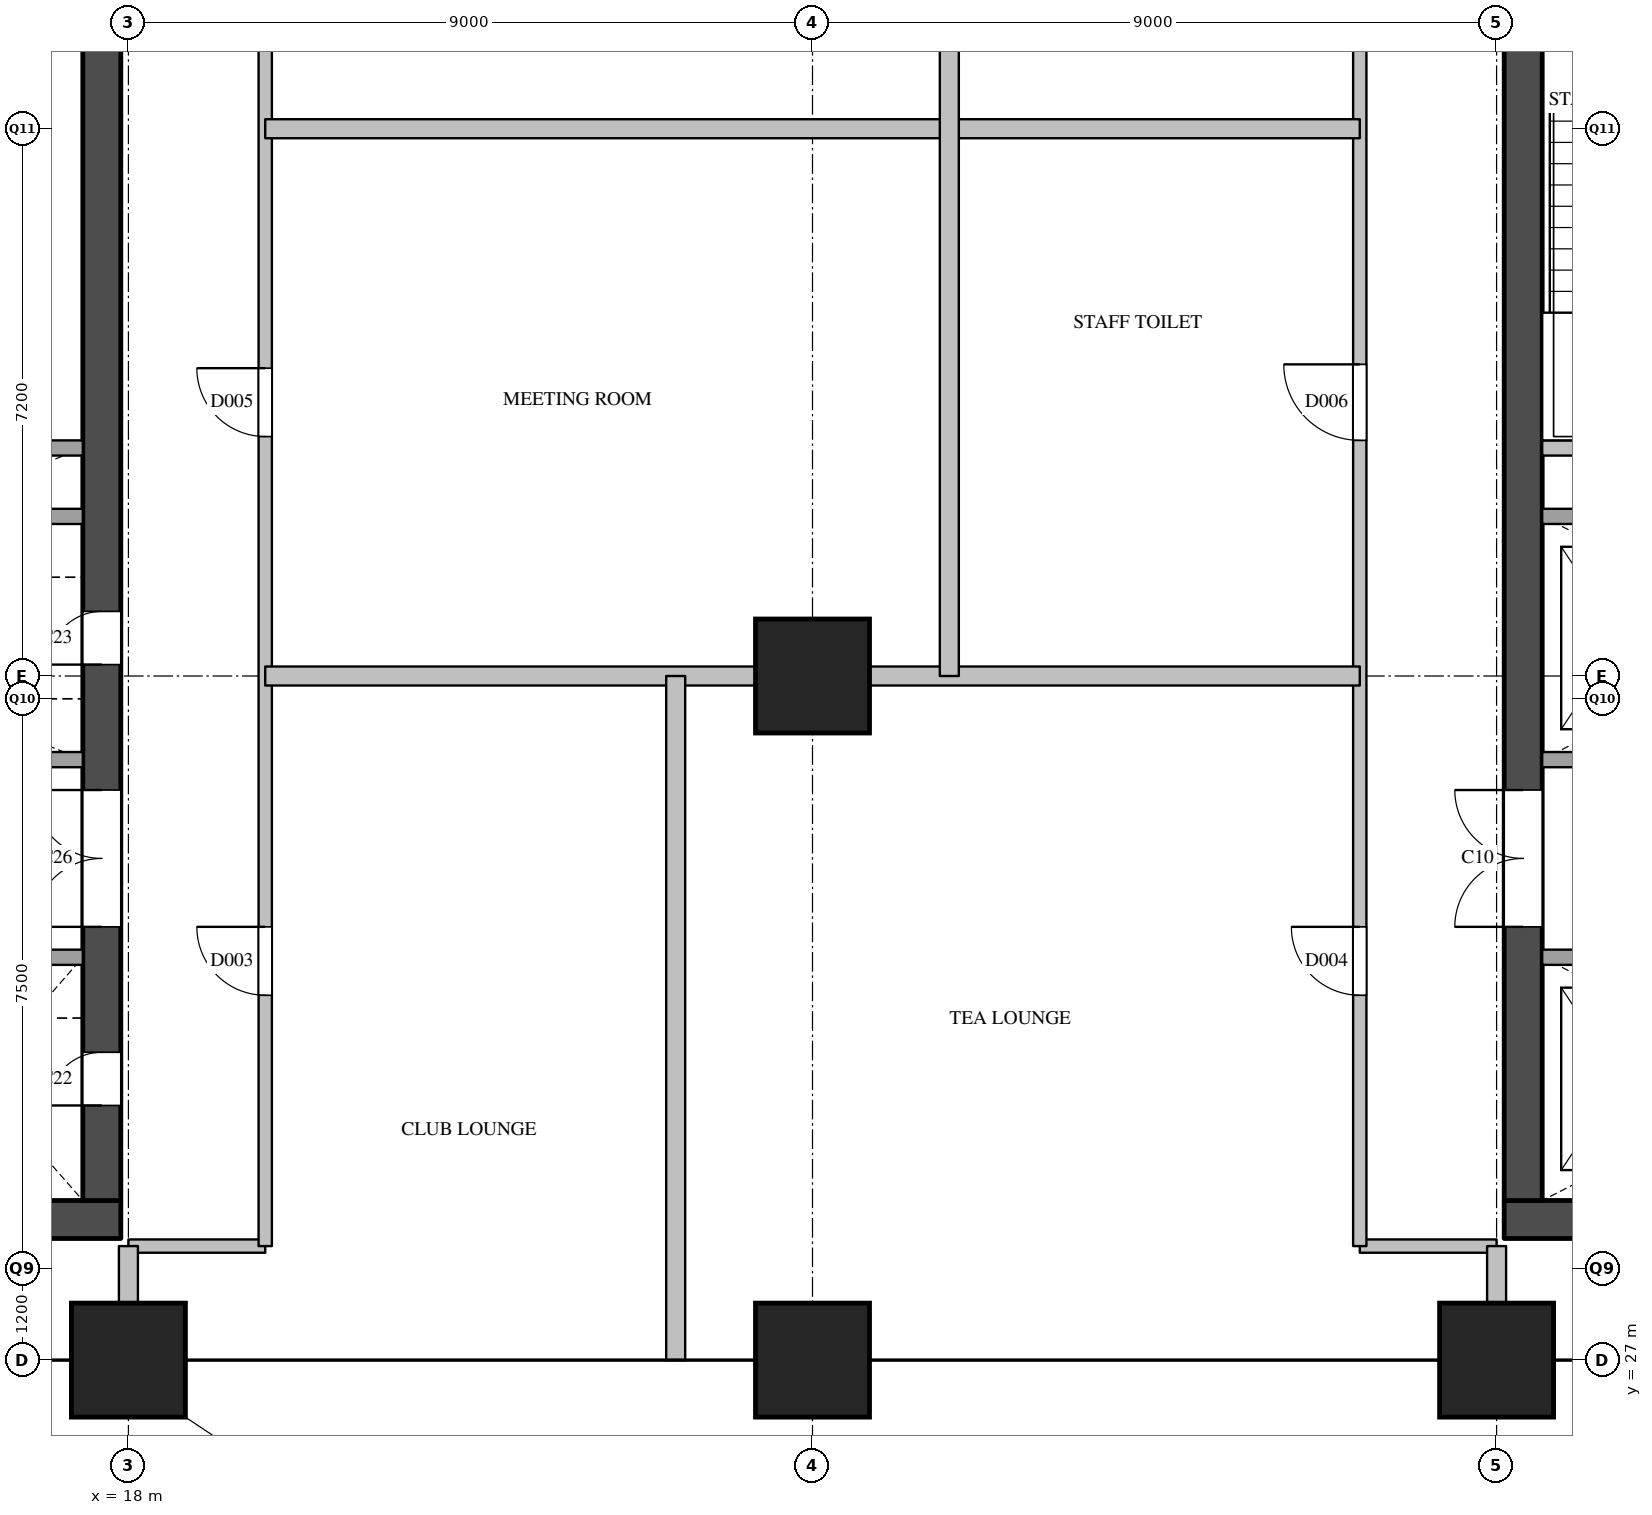
"""IFC4 building model, lengths in metres.
Left out: names, types, materials, properties, quantities, classifications, styles, units other than length and angle.
Written with IfcOpenShell. Run it as: python <this file> out.ifc"""

import sys

from ifc_helpers import new_model, si_unit, direction, frame, frame_2d, origin, origin_2d, place, context, subcontext, project, spatial, rectangle, extrude, element, fill, save


model = new_model("IFC4")
c1 = context("Model", 3, precision=1e-05, world=origin(), true_north=direction((0.0, 1.0)))
c2 = subcontext(c1, "Body", "Model", "MODEL_VIEW")
j1 = project(units=[si_unit("LENGTHUNIT", "METRE"), si_unit("PLANEANGLEUNIT", "RADIAN")], contexts=[c1])
p1 = place(None, origin())
s1 = spatial("IfcSite", under=j1, at=p1, CompositionType="ELEMENT")
p2 = place(p1, origin())
s2 = spatial("IfcBuilding", under=s1, at=p2, CompositionType="ELEMENT")
p3 = place(p2, frame((0.0, 0.0, 185.6)))
s3 = spatial("IfcBuildingStorey", under=s2, at=p3, CompositionType="ELEMENT", Elevation=185.6)
for number, where, z_axis, x_axis in (
    (1, (18.0, 27.0, 0.0), (0.0, 0.0, 1.0), (1.0, 0.0, 0.0)),
    (2, (27.0, 27.0, 0.0), (0.0, 0.0, 1.0), (1.0, 0.0, 0.0)),
    (3, (27.0, 36.0, 0.0), (0.0, 0.0, 1.0), (1.0, 0.0, 0.0)),
    (4, (36.0, 27.0, 0.0), (0.0, 0.0, 1.0), (1.0, 0.0, 0.0)),
):
    element("IfcColumn", number, at=place(p3, frame(where, z_axis=z_axis, x_axis=x_axis)), inside=s3, PredefinedType="COLUMN", context=c2, shape_type="SweptSolid", body=[
        extrude(rectangle(XDim=1.5, YDim=1.5, at=origin_2d()), origin(), (0.0, 0.0, 1.0), 3.9),
    ])
p4 = place(p3, frame((36.1, 28.85, 0.0), z_axis=(0.0, 0.0, 1.0), x_axis=(1.0, 0.0, 0.0)))
e5 = element("IfcWall", 5, at=p4, inside=s3, PredefinedType="SHEAR", context=c2, shape_type="SweptSolid", body=[
    extrude(rectangle(XDim=12.2, YDim=0.5, at=frame_2d((6.1, 0.0))), origin(), (0.0, 0.0, 1.0), 3.6),
])
p5 = place(p4, frame((0.95, 0.0, 0.0)))
e6 = element("IfcOpeningElement", 6, at=p5, cuts=e5, PredefinedType="OPENING", context=c2, shape_type="SweptSolid", body=[
    extrude(rectangle(XDim=1.2, YDim=2.1, at=frame_2d((0.6, 1.05))), frame((0.0, 0.26, 0.0), z_axis=(0.0, -1.0, 0.0), x_axis=(1.0, 0.0, 0.0)), (0.0, 0.0, 1.0), 0.52),
])
p6 = place(p4, frame((3.05, 0.0, 0.0)))
e7 = element("IfcOpeningElement", 7, at=p6, cuts=e5, PredefinedType="OPENING", context=c2, shape_type="SweptSolid", body=[
    extrude(rectangle(XDim=1.2, YDim=2.1, at=frame_2d((0.6, 1.05))), frame((0.0, 0.26, 0.0), z_axis=(0.0, -1.0, 0.0), x_axis=(1.0, 0.0, 0.0)), (0.0, 0.0, 1.0), 0.52),
])
p7 = place(p4, frame((5.15, 0.0, 0.0)))
e8 = element("IfcOpeningElement", 8, at=p7, cuts=e5, PredefinedType="OPENING", context=c2, shape_type="SweptSolid", body=[
    extrude(rectangle(XDim=1.2, YDim=2.1, at=frame_2d((0.6, 1.05))), frame((0.0, 0.26, 0.0), z_axis=(0.0, -1.0, 0.0), x_axis=(1.0, 0.0, 0.0)), (0.0, 0.0, 1.0), 0.52),
])
p8 = place(p3, frame((36.35, 29.1, 0.0), z_axis=(0.0, 0.0, 1.0), x_axis=(0.0, 1.0, 0.0)))
e9 = element("IfcWall", 9, at=p8, inside=s3, PredefinedType="SHEAR", context=c2, shape_type="SweptSolid", body=[
    extrude(rectangle(XDim=20.3, YDim=0.5, at=frame_2d((10.15, 0.0))), origin(), (0.0, 0.0, 1.0), 3.6),
])
p9 = place(p8, frame((3.6, 0.0, 0.0)))
e10 = element("IfcOpeningElement", 10, at=p9, cuts=e9, PredefinedType="OPENING", context=c2, shape_type="SweptSolid", body=[
    extrude(rectangle(XDim=1.8, YDim=2.1, at=frame_2d((0.9, 1.05))), frame((0.0, 0.26, 0.0), z_axis=(0.0, -1.0, 0.0), x_axis=(1.0, 0.0, 0.0)), (0.0, 0.0, 1.0), 0.52),
])
p10 = place(p8, frame((16.4, 0.0, 0.0)))
e11 = element("IfcOpeningElement", 11, at=p10, cuts=e9, PredefinedType="OPENING", context=c2, shape_type="SweptSolid", body=[
    extrude(rectangle(XDim=1.0, YDim=2.1, at=frame_2d((0.5, 1.05))), frame((0.0, 0.26, 0.0), z_axis=(0.0, -1.0, 0.0), x_axis=(1.0, 0.0, 0.0)), (0.0, 0.0, 1.0), 0.52),
])
p11 = place(p3, frame((36.6, 32.3, 0.0), z_axis=(0.0, 0.0, 1.0), x_axis=(1.0, 0.0, 0.0)))
e12 = element("IfcWall", 12, at=p11, inside=s3, PredefinedType="SOLIDWALL", context=c2, shape_type="SweptSolid", body=[
    extrude(rectangle(XDim=11.2, YDim=0.2, at=frame_2d((5.6, 0.0))), origin(), (0.0, 0.0, 1.0), 3.6),
])
p12 = place(p11, frame((7.225, 0.0, 0.0)))
e13 = element("IfcOpeningElement", 13, at=p12, cuts=e12, PredefinedType="OPENING", context=c2, shape_type="SweptSolid", body=[
    extrude(rectangle(XDim=1.2, YDim=2.1, at=frame_2d((0.6, 1.05))), frame((0.0, 0.11, 0.0), z_axis=(0.0, -1.0, 0.0), x_axis=(1.0, 0.0, 0.0)), (0.0, 0.0, 1.0), 0.22),
])
p13 = place(p11, frame((9.475, 0.0, 0.0)))
e14 = element("IfcOpeningElement", 14, at=p13, cuts=e12, PredefinedType="OPENING", context=c2, shape_type="SweptSolid", body=[
    extrude(rectangle(XDim=1.2, YDim=2.1, at=frame_2d((0.6, 1.05))), frame((0.0, 0.11, 0.0), z_axis=(0.0, -1.0, 0.0), x_axis=(1.0, 0.0, 0.0)), (0.0, 0.0, 1.0), 0.22),
])
p14 = place(p3, frame((36.6, 34.9, 0.0), z_axis=(0.0, 0.0, 1.0), x_axis=(1.0, 0.0, 0.0)))
e15 = element("IfcWall", 15, at=p14, inside=s3, PredefinedType="SOLIDWALL", context=c2, shape_type="SweptSolid", body=[
    extrude(rectangle(XDim=6.3, YDim=0.2, at=frame_2d((3.15, 0.0))), origin(), (0.0, 0.0, 1.0), 3.6),
])
p15 = place(p3, frame((36.6, 38.1, 0.0), z_axis=(0.0, 0.0, 1.0), x_axis=(1.0, 0.0, 0.0)))
e16 = element("IfcWall", 16, at=p15, inside=s3, PredefinedType="SOLIDWALL", context=c2, shape_type="SweptSolid", body=[
    extrude(rectangle(XDim=6.7, YDim=0.2, at=frame_2d((3.35, 0.0))), origin(), (0.0, 0.0, 1.0), 3.6),
])
p16 = place(p15, frame((0.45, 0.0, 0.0)))
e17 = element("IfcOpeningElement", 17, at=p16, cuts=e16, PredefinedType="OPENING", context=c2, shape_type="SweptSolid", body=[
    extrude(rectangle(XDim=1.2, YDim=2.1, at=frame_2d((0.6, 1.05))), frame((0.0, 0.11, 0.0), z_axis=(0.0, -1.0, 0.0), x_axis=(1.0, 0.0, 0.0)), (0.0, 0.0, 1.0), 0.22),
])
p17 = place(p15, frame((2.55, 0.0, 0.0)))
e18 = element("IfcOpeningElement", 18, at=p17, cuts=e16, PredefinedType="OPENING", context=c2, shape_type="SweptSolid", body=[
    extrude(rectangle(XDim=1.2, YDim=2.1, at=frame_2d((0.6, 1.05))), frame((0.0, 0.11, 0.0), z_axis=(0.0, -1.0, 0.0), x_axis=(1.0, 0.0, 0.0)), (0.0, 0.0, 1.0), 0.22),
])
p18 = place(p15, frame((4.65, 0.0, 0.0)))
e19 = element("IfcOpeningElement", 19, at=p18, cuts=e16, PredefinedType="OPENING", context=c2, shape_type="SweptSolid", body=[
    extrude(rectangle(XDim=1.2, YDim=2.1, at=frame_2d((0.6, 1.05))), frame((0.0, 0.11, 0.0), z_axis=(0.0, -1.0, 0.0), x_axis=(1.0, 0.0, 0.0)), (0.0, 0.0, 1.0), 0.22),
])
p19 = place(p3, frame((36.6, 39.0, 0.0), z_axis=(0.0, 0.0, 1.0), x_axis=(1.0, 0.0, 0.0)))
e20 = element("IfcWall", 20, at=p19, inside=s3, PredefinedType="SOLIDWALL", context=c2, shape_type="SweptSolid", body=[
    extrude(rectangle(XDim=3.25, YDim=0.2, at=frame_2d((1.625, 0.0))), origin(), (0.0, 0.0, 1.0), 3.6),
])
p20 = place(p3, frame((5.7, 28.85, 0.0), z_axis=(0.0, 0.0, 1.0), x_axis=(1.0, 0.0, 0.0)))
e21 = element("IfcWall", 21, at=p20, inside=s3, PredefinedType="SHEAR", context=c2, shape_type="SweptSolid", body=[
    extrude(rectangle(XDim=12.2, YDim=0.5, at=frame_2d((6.1, 0.0))), origin(), (0.0, 0.0, 1.0), 3.6),
])
p21 = place(p20, frame((9.35, 0.0, 0.0)))
e22 = element("IfcOpeningElement", 22, at=p21, cuts=e21, PredefinedType="OPENING", context=c2, shape_type="SweptSolid", body=[
    extrude(rectangle(XDim=1.2, YDim=2.1, at=frame_2d((0.6, 1.05))), frame((0.0, 0.26, 0.0), z_axis=(0.0, -1.0, 0.0), x_axis=(1.0, 0.0, 0.0)), (0.0, 0.0, 1.0), 0.52),
])
p22 = place(p3, frame((17.65, 29.1, 0.0), z_axis=(0.0, 0.0, 1.0), x_axis=(0.0, 1.0, 0.0)))
e23 = element("IfcWall", 23, at=p22, inside=s3, PredefinedType="SHEAR", context=c2, shape_type="SweptSolid", body=[
    extrude(rectangle(XDim=20.3, YDim=0.5, at=frame_2d((10.15, 0.0))), origin(), (0.0, 0.0, 1.0), 3.6),
])
p23 = place(p22, frame((1.25, 0.0, 0.0)))
e24 = element("IfcOpeningElement", 24, at=p23, cuts=e23, PredefinedType="OPENING", context=c2, shape_type="SweptSolid", body=[
    extrude(rectangle(XDim=0.7, YDim=2.1, at=frame_2d((0.35, 1.05))), frame((0.0, 0.26, 0.0), z_axis=(0.0, -1.0, 0.0), x_axis=(1.0, 0.0, 0.0)), (0.0, 0.0, 1.0), 0.52),
])
p24 = place(p22, frame((7.05, 0.0, 0.0)))
e25 = element("IfcOpeningElement", 25, at=p24, cuts=e23, PredefinedType="OPENING", context=c2, shape_type="SweptSolid", body=[
    extrude(rectangle(XDim=0.7, YDim=2.1, at=frame_2d((0.35, 1.05))), frame((0.0, 0.26, 0.0), z_axis=(0.0, -1.0, 0.0), x_axis=(1.0, 0.0, 0.0)), (0.0, 0.0, 1.0), 0.52),
])
p25 = place(p22, frame((3.6, 0.0, 0.0)))
e26 = element("IfcOpeningElement", 26, at=p25, cuts=e23, PredefinedType="OPENING", context=c2, shape_type="SweptSolid", body=[
    extrude(rectangle(XDim=1.8, YDim=2.1, at=frame_2d((0.9, 1.05))), frame((0.0, 0.26, 0.0), z_axis=(0.0, -1.0, 0.0), x_axis=(1.0, 0.0, 0.0)), (0.0, 0.0, 1.0), 0.52),
])
for number, where, z_axis, x_axis in (
    (27, (14.6, 32.3, 0.0), (0.0, 0.0, 1.0), (1.0, 0.0, 0.0)),
    (28, (14.6, 34.9, 0.0), (0.0, 0.0, 1.0), (1.0, 0.0, 0.0)),
):
    element("IfcWall", number, at=place(p3, frame(where, z_axis=z_axis, x_axis=x_axis)), inside=s3, PredefinedType="SOLIDWALL", context=c2, shape_type="SweptSolid", body=[
        extrude(rectangle(XDim=2.8, YDim=0.2, at=frame_2d((1.4, 0.0))), origin(), (0.0, 0.0, 1.0), 3.6),
    ])
p26 = place(p3, frame((6.2, 38.1, 0.0), z_axis=(0.0, 0.0, 1.0), x_axis=(1.0, 0.0, 0.0)))
e29 = element("IfcWall", 29, at=p26, inside=s3, PredefinedType="SOLIDWALL", context=c2, shape_type="SweptSolid", body=[
    extrude(rectangle(XDim=11.2, YDim=0.2, at=frame_2d((5.6, 0.0))), origin(), (0.0, 0.0, 1.0), 3.6),
])
p27 = place(p26, frame((8.85, 0.0, 0.0)))
e30 = element("IfcOpeningElement", 30, at=p27, cuts=e29, PredefinedType="OPENING", context=c2, shape_type="SweptSolid", body=[
    extrude(rectangle(XDim=1.2, YDim=2.1, at=frame_2d((0.6, 1.05))), frame((0.0, 0.11, 0.0), z_axis=(0.0, -1.0, 0.0), x_axis=(1.0, 0.0, 0.0)), (0.0, 0.0, 1.0), 0.22),
])
p28 = place(p3, frame((12.5, 39.0, 0.0), z_axis=(0.0, 0.0, 1.0), x_axis=(1.0, 0.0, 0.0)))
e31 = element("IfcWall", 31, at=p28, inside=s3, PredefinedType="SOLIDWALL", context=c2, shape_type="SweptSolid", body=[
    extrude(rectangle(XDim=4.9, YDim=0.2, at=frame_2d((2.45, 0.0))), origin(), (0.0, 0.0, 1.0), 3.6),
])
for number, where, z_axis, x_axis in (
    (32, (18.0, 28.5, 0.0), (0.0, 0.0, 1.0), (1.0, 0.0, 0.0)),
    (33, (34.2, 28.5, 0.0), (0.0, 0.0, 1.0), (1.0, 0.0, 0.0)),
):
    element("IfcWall", number, at=place(p3, frame(where, z_axis=z_axis, x_axis=x_axis)), inside=s3, PredefinedType="PARTITIONING", context=c2, shape_type="SweptSolid", body=[
        extrude(rectangle(XDim=1.8, YDim=0.175, at=frame_2d((0.9, 0.0))), origin(), (0.0, 0.0, 1.0), 3.6),
    ])
p29 = place(p3, frame((19.8, 28.5, 0.0), z_axis=(0.0, 0.0, 1.0), x_axis=(0.0, 1.0, 0.0)))
e34 = element("IfcWall", 34, at=p29, inside=s3, PredefinedType="PARTITIONING", context=c2, shape_type="SweptSolid", body=[
    extrude(rectangle(XDim=23.3, YDim=0.175, at=frame_2d((11.65, 0.0))), origin(), (0.0, 0.0, 1.0), 3.6),
])
p30 = place(p29, frame((3.3, 0.0, 0.0)))
e35 = element("IfcOpeningElement", 35, at=p30, cuts=e34, PredefinedType="OPENING", context=c2, shape_type="SweptSolid", body=[
    extrude(rectangle(XDim=0.9, YDim=2.1, at=frame_2d((0.45, 1.05))), frame((0.0, 0.097, 0.0), z_axis=(0.0, -1.0, 0.0), x_axis=(1.0, 0.0, 0.0)), (0.0, 0.0, 1.0), 0.195),
])
p31 = place(p29, frame((10.65, 0.0, 0.0)))
e36 = element("IfcOpeningElement", 36, at=p31, cuts=e34, PredefinedType="OPENING", context=c2, shape_type="SweptSolid", body=[
    extrude(rectangle(XDim=0.9, YDim=2.1, at=frame_2d((0.45, 1.05))), frame((0.0, 0.097, 0.0), z_axis=(0.0, -1.0, 0.0), x_axis=(1.0, 0.0, 0.0)), (0.0, 0.0, 1.0), 0.195),
])
p32 = place(p29, frame((18.55, 0.0, 0.0)))
e37 = element("IfcOpeningElement", 37, at=p32, cuts=e34, PredefinedType="OPENING", context=c2, shape_type="SweptSolid", body=[
    extrude(rectangle(XDim=0.9, YDim=2.1, at=frame_2d((0.45, 1.05))), frame((0.0, 0.097, 0.0), z_axis=(0.0, -1.0, 0.0), x_axis=(1.0, 0.0, 0.0)), (0.0, 0.0, 1.0), 0.195),
])
p33 = place(p3, frame((34.2, 28.5, 0.0), z_axis=(0.0, 0.0, 1.0), x_axis=(0.0, 1.0, 0.0)))
e38 = element("IfcWall", 38, at=p33, inside=s3, PredefinedType="PARTITIONING", context=c2, shape_type="SweptSolid", body=[
    extrude(rectangle(XDim=23.3, YDim=0.175, at=frame_2d((11.65, 0.0))), origin(), (0.0, 0.0, 1.0), 3.6),
])
p34 = place(p33, frame((3.3, 0.0, 0.0)))
e39 = element("IfcOpeningElement", 39, at=p34, cuts=e38, PredefinedType="OPENING", context=c2, shape_type="SweptSolid", body=[
    extrude(rectangle(XDim=0.9, YDim=2.1, at=frame_2d((0.45, 1.05))), frame((0.0, 0.097, 0.0), z_axis=(0.0, -1.0, 0.0), x_axis=(1.0, 0.0, 0.0)), (0.0, 0.0, 1.0), 0.195),
])
p35 = place(p33, frame((10.6, 0.0, 0.0)))
e40 = element("IfcOpeningElement", 40, at=p35, cuts=e38, PredefinedType="OPENING", context=c2, shape_type="SweptSolid", body=[
    extrude(rectangle(XDim=1.0, YDim=2.1, at=frame_2d((0.5, 1.05))), frame((0.0, 0.097, 0.0), z_axis=(0.0, -1.0, 0.0), x_axis=(1.0, 0.0, 0.0)), (0.0, 0.0, 1.0), 0.195),
])
p36 = place(p33, frame((18.55, 0.0, 0.0)))
e41 = element("IfcOpeningElement", 41, at=p36, cuts=e38, PredefinedType="OPENING", context=c2, shape_type="SweptSolid", body=[
    extrude(rectangle(XDim=0.9, YDim=2.1, at=frame_2d((0.45, 1.05))), frame((0.0, 0.097, 0.0), z_axis=(0.0, -1.0, 0.0), x_axis=(1.0, 0.0, 0.0)), (0.0, 0.0, 1.0), 0.195),
])
p37 = place(p3, frame((19.8, 36.0, 0.0), z_axis=(0.0, 0.0, 1.0), x_axis=(1.0, 0.0, 0.0)))
e42 = element("IfcWall", 42, at=p37, inside=s3, PredefinedType="PARTITIONING", context=c2, shape_type="SweptSolid", body=[
    extrude(rectangle(XDim=14.4, YDim=0.25, at=frame_2d((7.2, 0.0))), origin(), (0.0, 0.0, 1.0), 3.6),
])
p38 = place(p3, frame((19.8, 43.2, 0.0), z_axis=(0.0, 0.0, 1.0), x_axis=(1.0, 0.0, 0.0)))
e43 = element("IfcWall", 43, at=p38, inside=s3, PredefinedType="PARTITIONING", context=c2, shape_type="SweptSolid", body=[
    extrude(rectangle(XDim=14.4, YDim=0.25, at=frame_2d((7.2, 0.0))), origin(), (0.0, 0.0, 1.0), 2.6),
])
p39 = place(p3, frame((18.0, 27.0, 0.0), z_axis=(0.0, 0.0, 1.0), x_axis=(0.0, 1.0, 0.0)))
e44 = element("IfcWall", 44, at=p39, inside=s3, PredefinedType="PARTITIONING", context=c2, shape_type="SweptSolid", body=[
    extrude(rectangle(XDim=1.5, YDim=0.25, at=frame_2d((0.75, 0.0))), origin(), (0.0, 0.0, 1.0), 3.6),
])
p40 = place(p3, frame((25.2, 27.0, 0.0), z_axis=(0.0, 0.0, 1.0), x_axis=(0.0, 1.0, 0.0)))
e45 = element("IfcWall", 45, at=p40, inside=s3, PredefinedType="PARTITIONING", context=c2, shape_type="SweptSolid", body=[
    extrude(rectangle(XDim=9.0, YDim=0.25, at=frame_2d((4.5, 0.0))), origin(), (0.0, 0.0, 1.0), 2.6),
])
p41 = place(p3, frame((28.8, 36.0, 0.0), z_axis=(0.0, 0.0, 1.0), x_axis=(0.0, 1.0, 0.0)))
e46 = element("IfcWall", 46, at=p41, inside=s3, PredefinedType="PARTITIONING", context=c2, shape_type="SweptSolid", body=[
    extrude(rectangle(XDim=18.0, YDim=0.25, at=frame_2d((9.0, 0.0))), origin(), (0.0, 0.0, 1.0), 2.6),
])
p42 = place(p3, frame((36.0, 27.0, 0.0), z_axis=(0.0, 0.0, 1.0), x_axis=(0.0, 1.0, 0.0)))
e47 = element("IfcWall", 47, at=p42, inside=s3, PredefinedType="PARTITIONING", context=c2, shape_type="SweptSolid", body=[
    extrude(rectangle(XDim=1.5, YDim=0.25, at=frame_2d((0.75, 0.0))), origin(), (0.0, 0.0, 1.0), 3.6),
])
p43 = place(p9, origin())
e48 = element("IfcDoor", 48, at=p43, inside=s3, OperationType="DOUBLE_DOOR_SINGLE_SWING", PredefinedType="DOOR", context=c2, shape_type="SweptSolid", body=[
    extrude(rectangle(XDim=1.8, YDim=2.1, at=frame_2d((0.9, 1.05))), frame((0.0, 0.025, 0.0), z_axis=(0.0, -1.0, 0.0), x_axis=(1.0, 0.0, 0.0)), (0.0, 0.0, 1.0), 0.05),
])
fill(e10, e48)
p44 = place(p23, origin())
e49 = element("IfcDoor", 49, at=p44, inside=s3, OperationType="SINGLE_SWING_LEFT", PredefinedType="DOOR", context=c2, shape_type="SweptSolid", body=[
    extrude(rectangle(XDim=0.7, YDim=2.1, at=frame_2d((0.35, 1.05))), frame((0.0, 0.025, 0.0), z_axis=(0.0, -1.0, 0.0), x_axis=(1.0, 0.0, 0.0)), (0.0, 0.0, 1.0), 0.05),
])
fill(e24, e49)
p45 = place(p24, origin())
e50 = element("IfcDoor", 50, at=p45, inside=s3, OperationType="SINGLE_SWING_LEFT", PredefinedType="DOOR", context=c2, shape_type="SweptSolid", body=[
    extrude(rectangle(XDim=0.7, YDim=2.1, at=frame_2d((0.35, 1.05))), frame((0.0, 0.025, 0.0), z_axis=(0.0, -1.0, 0.0), x_axis=(1.0, 0.0, 0.0)), (0.0, 0.0, 1.0), 0.05),
])
fill(e25, e50)
p46 = place(p25, origin())
e51 = element("IfcDoor", 51, at=p46, inside=s3, OperationType="DOUBLE_DOOR_SINGLE_SWING", PredefinedType="DOOR", context=c2, shape_type="SweptSolid", body=[
    extrude(rectangle(XDim=1.8, YDim=2.1, at=frame_2d((0.9, 1.05))), frame((0.0, 0.025, 0.0), z_axis=(0.0, -1.0, 0.0), x_axis=(1.0, 0.0, 0.0)), (0.0, 0.0, 1.0), 0.05),
])
fill(e26, e51)
p47 = place(p30, origin())
e52 = element("IfcDoor", 52, at=p47, inside=s3, OperationType="SINGLE_SWING_RIGHT", PredefinedType="DOOR", context=c2, shape_type="SweptSolid", body=[
    extrude(rectangle(XDim=0.9, YDim=2.1, at=frame_2d((0.45, 1.05))), frame((0.0, 0.025, 0.0), z_axis=(0.0, -1.0, 0.0), x_axis=(1.0, 0.0, 0.0)), (0.0, 0.0, 1.0), 0.05),
])
fill(e35, e52)
p48 = place(p34, origin())
e53 = element("IfcDoor", 53, at=p48, inside=s3, OperationType="SINGLE_SWING_RIGHT", PredefinedType="DOOR", context=c2, shape_type="SweptSolid", body=[
    extrude(rectangle(XDim=0.9, YDim=2.1, at=frame_2d((0.45, 1.05))), frame((0.0, 0.025, 0.0), z_axis=(0.0, -1.0, 0.0), x_axis=(1.0, 0.0, 0.0)), (0.0, 0.0, 1.0), 0.05),
])
fill(e39, e53)
p49 = place(p31, origin())
e54 = element("IfcDoor", 54, at=p49, inside=s3, OperationType="SINGLE_SWING_RIGHT", PredefinedType="DOOR", context=c2, shape_type="SweptSolid", body=[
    extrude(rectangle(XDim=0.9, YDim=2.1, at=frame_2d((0.45, 1.05))), frame((0.0, 0.025, 0.0), z_axis=(0.0, -1.0, 0.0), x_axis=(1.0, 0.0, 0.0)), (0.0, 0.0, 1.0), 0.05),
])
fill(e36, e54)
p50 = place(p35, origin())
e55 = element("IfcDoor", 55, at=p50, inside=s3, OperationType="SINGLE_SWING_RIGHT", PredefinedType="DOOR", context=c2, shape_type="SweptSolid", body=[
    extrude(rectangle(XDim=1.0, YDim=2.1, at=frame_2d((0.5, 1.05))), frame((0.0, 0.025, 0.0), z_axis=(0.0, -1.0, 0.0), x_axis=(1.0, 0.0, 0.0)), (0.0, 0.0, 1.0), 0.05),
])
fill(e40, e55)
save(model, sys.argv[1])
